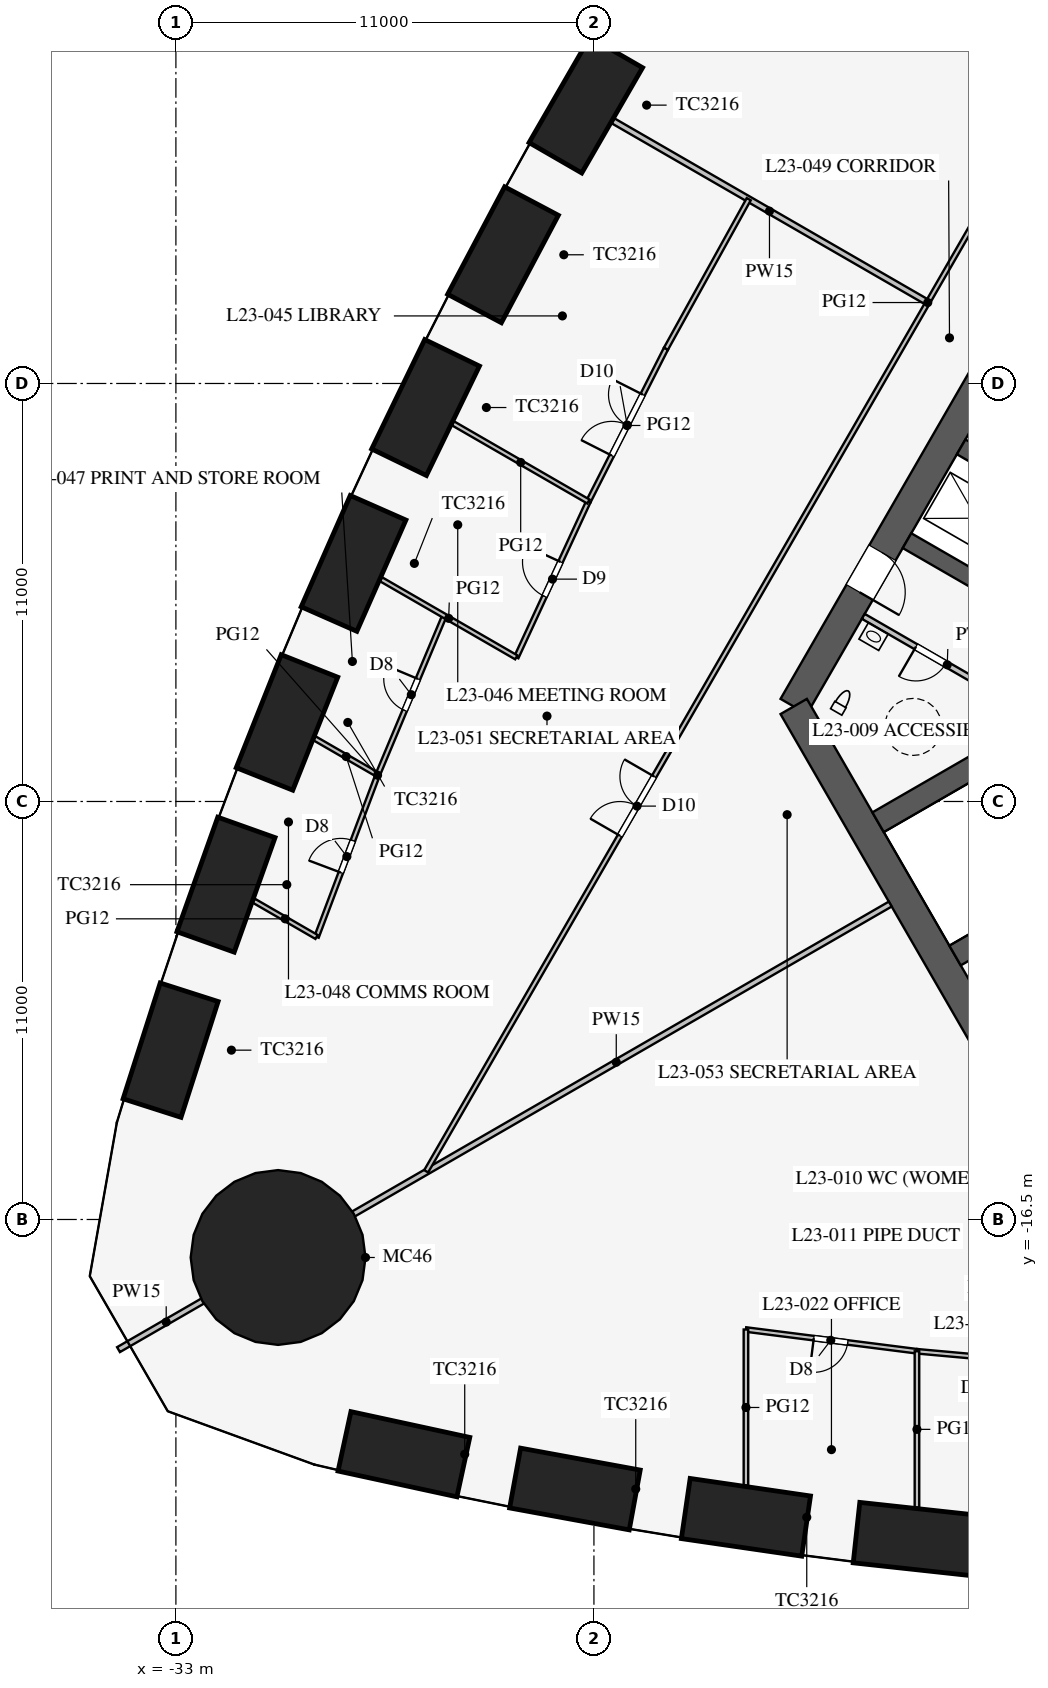
"""IFC4 building model, lengths in metres.
Left out: names, types, materials, properties, quantities, classifications, styles, units other than length and angle.
Written with IfcOpenShell. Run it as: python <this file> out.ifc"""

import sys

from ifc_helpers import new_model, si_unit, direction, frame, frame_2d, origin, origin_2d, place, context, subcontext, project, spatial, rectangle, circle, extrude, element, fill, save


model = new_model("IFC4")
c1 = context("Model", 3, precision=1e-05, world=origin(), true_north=direction((0.0, 1.0)))
c2 = subcontext(c1, "Body", "Model", "MODEL_VIEW")
j1 = project(units=[si_unit("LENGTHUNIT", "METRE"), si_unit("PLANEANGLEUNIT", "RADIAN")], contexts=[c1])
p1 = place(None, origin())
s1 = spatial("IfcSite", under=j1, at=p1, CompositionType="ELEMENT")
p2 = place(p1, origin())
s2 = spatial("IfcBuilding", under=s1, at=p2, CompositionType="ELEMENT")
p3 = place(p2, frame((0.0, 0.0, 103.1)))
s3 = spatial("IfcBuildingStorey", under=s2, at=p3, CompositionType="ELEMENT", Elevation=103.1)
for number, where, z_axis, x_axis in (
    (1, (-27.0, -22.677, 0.0), (0.0, 0.0, 1.0), (0.977, -0.212, 0.0)),
    (2, (-22.5, -23.593, 0.0), (0.0, 0.0, 1.0), (0.984, -0.18, 0.0)),
    (3, (-18.0, -24.337, 0.0), (0.0, 0.0, 1.0), (0.99, -0.144, 0.0)),
    (4, (-13.5, -24.913, 0.0), (0.0, 0.0, 1.0), (0.994, -0.108, 0.0)),
    (5, (-22.213, 12.825, 0.0), (0.0, 0.0, 1.0), (-0.5, -0.866, 0.0)),
    (6, (-24.393, 8.887, 0.0), (0.0, 0.0, 1.0), (-0.468, -0.883, 0.0)),
    (7, (-26.43, 4.867, 0.0), (0.0, 0.0, 1.0), (-0.436, -0.9, 0.0)),
    (8, (-28.325, 0.765, 0.0), (0.0, 0.0, 1.0), (-0.403, -0.915, 0.0)),
    (9, (-30.077, -3.42, 0.0), (0.0, 0.0, 1.0), (-0.37, -0.929, 0.0)),
    (10, (-31.682, -7.689, 0.0), (0.0, 0.0, 1.0), (-0.336, -0.942, 0.0)),
    (11, (-33.139, -12.044, 0.0), (0.0, 0.0, 1.0), (-0.305, -0.952, 0.0)),
):
    element("IfcColumn", number, at=place(p3, frame(where, z_axis=z_axis, x_axis=x_axis)), inside=s3, PredefinedType="COLUMN", context=c2, shape_type="SweptSolid", body=[
        extrude(rectangle(XDim=3.2, YDim=1.6, at=origin_2d()), origin(), (0.0, 0.0, 1.0), 4.2),
    ])
p4 = place(p3, frame((-30.311, -17.5, 0.0), z_axis=(0.0, 0.0, 1.0), x_axis=(1.0, 0.0, 0.0)))
e12 = element("IfcColumn", 12, at=p4, inside=s3, PredefinedType="COLUMN", context=c2, shape_type="SweptSolid", body=[
    extrude(circle(Radius=2.3, at=origin_2d()), origin(), (0.0, 0.0, 1.0), 4.2),
])
p5 = place(p3, frame((-5.773, 16.0, 0.0), z_axis=(0.0, 0.0, 1.0), x_axis=(-0.500002442456, -0.866023993627, 0.0)))
e13 = element("IfcWall", 13, at=p5, inside=s3, PredefinedType="SHEAR", context=c2, shape_type="SweptSolid", body=[
    extrude(rectangle(XDim=21.939, YDim=0.8, at=frame_2d((10.97, 0.0))), origin(), (0.0, 0.0, 1.0), 4.2),
])
p6 = place(p5, frame((17.27, 0.0, 0.0)))
e14 = element("IfcOpeningElement", 14, at=p6, cuts=e13, PredefinedType="OPENING", context=c2, shape_type="SweptSolid", body=[
    extrude(rectangle(XDim=1.2, YDim=2.1, at=frame_2d((0.6, 1.05))), frame((0.0, 0.41, 0.0), z_axis=(0.0, -1.0, 0.0), x_axis=(1.0, 0.0, 0.0)), (0.0, 0.0, 1.0), 0.82),
])
p7 = place(p5, frame((3.47, 0.0, 0.0)))
e15 = element("IfcOpeningElement", 15, at=p7, cuts=e13, PredefinedType="OPENING", context=c2, shape_type="SweptSolid", body=[
    extrude(rectangle(XDim=1.2, YDim=2.1, at=frame_2d((0.6, 1.05))), frame((0.0, 0.41, 0.0), z_axis=(0.0, -1.0, 0.0), x_axis=(1.0, 0.0, 0.0)), (0.0, 0.0, 1.0), 0.82),
])
p8 = place(p3, frame((-16.743, -3.0, 0.0), z_axis=(0.0, 0.0, 1.0), x_axis=(0.499995765644, -0.866027848477, 0.0)))
e16 = element("IfcWall", 16, at=p8, inside=s3, PredefinedType="SHEAR", context=c2, shape_type="SweptSolid", body=[
    extrude(rectangle(XDim=11.547, YDim=0.8, at=frame_2d((5.773, 0.0))), origin(), (0.0, 0.0, 1.0), 4.2),
])
for number, where, z_axis, x_axis in (
    (17, (-10.107, 2.544, 0.0), (0.0, 0.0, 1.0), (-0.866, 0.5, 0.0)),
    (18, (-11.532, 0.076, 0.0), (0.0, 0.0, 1.0), (-0.866, 0.5, 0.0)),
):
    element("IfcWall", number, at=place(p3, frame(where, z_axis=z_axis, x_axis=x_axis)), inside=s3, PredefinedType="SHEAR", context=c2, shape_type="SweptSolid", body=[
        extrude(rectangle(XDim=2.575, YDim=0.45, at=frame_2d((1.288, 0.0))), origin(), (0.0, 0.0, 1.0), 4.2),
    ])
for number, where, z_axis, x_axis in (
    (19, (-6.663, -1.509, 0.0), (0.0, 0.0, 1.0), (-0.866, -0.5, 0.0)),
    (20, (-4.638, -5.016, 0.0), (0.0, 0.0, 1.0), (-0.866, -0.5, 0.0)),
):
    element("IfcWall", number, at=place(p3, frame(where, z_axis=z_axis, x_axis=x_axis)), inside=s3, PredefinedType="SHEAR", context=c2, shape_type="SweptSolid", body=[
        extrude(rectangle(XDim=9.075, YDim=0.6, at=frame_2d((4.538, 0.0))), origin(), (0.0, 0.0, 1.0), 4.2),
    ])
p9 = place(p3, frame((-10.495, -3.178, 0.0), z_axis=(0.0, 0.0, 1.0), x_axis=(-0.86602216432, 0.500005610874, 0.0)))
e21 = element("IfcWall", 21, at=p9, inside=s3, PredefinedType="PARTITIONING", context=c2, shape_type="SweptSolid", body=[
    extrude(rectangle(XDim=5.1, YDim=0.15, at=frame_2d((2.55, 0.0))), origin(), (0.0, 0.0, 1.0), 4.0),
])
p10 = place(p9, frame((2.6, 0.0, 0.0)))
e22 = element("IfcOpeningElement", 22, at=p10, cuts=e21, PredefinedType="OPENING", context=c2, shape_type="SweptSolid", body=[
    extrude(rectangle(XDim=0.9, YDim=2.1, at=frame_2d((0.45, 1.05))), frame((0.0, 0.085, 0.0), z_axis=(0.0, -1.0, 0.0), x_axis=(1.0, 0.0, 0.0)), (0.0, 0.0, 1.0), 0.17),
])
p11 = place(p3, frame((-14.203, -8.2, 0.0), z_axis=(0.0, 0.0, 1.0), x_axis=(-0.866024668836, -0.500001272966, 0.0)))
e23 = element("IfcWall", 23, at=p11, inside=s3, PredefinedType="PARTITIONING", context=c2, shape_type="SweptSolid", body=[
    extrude(rectangle(XDim=16.65, YDim=0.15, at=frame_2d((8.325, 0.0))), origin(), (0.0, 0.0, 1.0), 2.3),
])
p12 = place(p3, frame((-32.0, -18.475, 0.0), z_axis=(0.0, 0.0, 1.0), x_axis=(-0.866042548026, -0.499970304126, 0.0)))
e24 = element("IfcWall", 24, at=p12, inside=s3, PredefinedType="PARTITIONING", context=c2, shape_type="SweptSolid", body=[
    extrude(rectangle(XDim=2.899, YDim=0.15, at=frame_2d((1.45, 0.0))), origin(), (0.0, 0.0, 1.0), 2.3),
])
p13 = place(p3, frame((-13.5, -19.968, 0.0), z_axis=(0.0, 0.0, 1.0), x_axis=(0.995930325215, -0.090126507295, 0.0)))
e25 = element("IfcWall", 25, at=p13, inside=s3, PredefinedType="PARTITIONING", context=c2, shape_type="SweptSolid", body=[
    extrude(rectangle(XDim=4.518, YDim=0.12, at=frame_2d((2.259, 0.0))), origin(), (0.0, 0.0, 1.0), 2.9),
])
p14 = place(p13, frame((1.8, 0.0, 0.15)))
e26 = element("IfcOpeningElement", 26, at=p14, cuts=e25, PredefinedType="OPENING", context=c2, shape_type="SweptSolid", body=[
    extrude(rectangle(XDim=0.9, YDim=2.1, at=frame_2d((0.45, 1.05))), frame((0.0, 0.07, 0.0), z_axis=(0.0, -1.0, 0.0), x_axis=(1.0, 0.0, 0.0)), (0.0, 0.0, 1.0), 0.14),
])
p15 = place(p3, frame((-18.0, -19.396, 0.0), z_axis=(0.0, 0.0, 1.0), x_axis=(0.992010652594, -0.12615413247, 0.0)))
e27 = element("IfcWall", 27, at=p15, inside=s3, PredefinedType="PARTITIONING", context=c2, shape_type="SweptSolid", body=[
    extrude(rectangle(XDim=4.536, YDim=0.12, at=frame_2d((2.268, 0.0))), origin(), (0.0, 0.0, 1.0), 2.9),
])
p16 = place(p15, frame((1.8, 0.0, 0.15)))
e28 = element("IfcOpeningElement", 28, at=p16, cuts=e27, PredefinedType="OPENING", context=c2, shape_type="SweptSolid", body=[
    extrude(rectangle(XDim=0.9, YDim=2.1, at=frame_2d((0.45, 1.05))), frame((0.0, 0.07, 0.0), z_axis=(0.0, -1.0, 0.0), x_axis=(1.0, 0.0, 0.0)), (0.0, 0.0, 1.0), 0.14),
])
p17 = place(p3, frame((-13.5, -19.968, 0.0), z_axis=(0.0, 0.0, 1.0), x_axis=(0.0, -1.0, 0.0)))
e29 = element("IfcWall", 29, at=p17, inside=s3, PredefinedType="PARTITIONING", context=c2, shape_type="SweptSolid", body=[
    extrude(rectangle(XDim=4.11, YDim=0.12, at=frame_2d((2.055, 0.0))), origin(), (0.0, 0.0, 1.0), 2.2),
])
p18 = place(p3, frame((-18.0, -19.396, 0.0), z_axis=(0.0, 0.0, 1.0), x_axis=(0.0, -1.0, 0.0)))
e30 = element("IfcWall", 30, at=p18, inside=s3, PredefinedType="PARTITIONING", context=c2, shape_type="SweptSolid", body=[
    extrude(rectangle(XDim=4.103, YDim=0.12, at=frame_2d((2.052, 0.0))), origin(), (0.0, 0.0, 1.0), 2.4),
])
p19 = place(p3, frame((-13.268, 7.66, 0.0), z_axis=(0.0, 0.0, 1.0), x_axis=(-0.866013963754, 0.500019814191, 0.0)))
e31 = element("IfcWall", 31, at=p19, inside=s3, PredefinedType="PARTITIONING", context=c2, shape_type="SweptSolid", body=[
    extrude(rectangle(XDim=9.5, YDim=0.15, at=frame_2d((4.75, 0.0))), origin(), (0.0, 0.0, 1.0), 2.4),
])
p20 = place(p3, frame((-0.016, 30.491, 0.0), z_axis=(0.0, 0.0, 1.0), x_axis=(-0.50000091641, -0.866024874695, 0.0)))
e32 = element("IfcWall", 32, at=p20, inside=s3, PredefinedType="PARTITIONING", context=c2, shape_type="SweptSolid", body=[
    extrude(rectangle(XDim=52.796, YDim=0.12, at=frame_2d((26.398, 0.0))), origin(), (0.0, 0.0, 1.0), 2.9),
])
p21 = place(p20, frame((10.2, 0.0, 0.15)))
e33 = element("IfcOpeningElement", 33, at=p21, cuts=e32, PredefinedType="OPENING", context=c2, shape_type="SweptSolid", body=[
    extrude(rectangle(XDim=1.8, YDim=2.1, at=frame_2d((0.9, 1.05))), frame((0.0, 0.07, 0.0), z_axis=(0.0, -1.0, 0.0), x_axis=(1.0, 0.0, 0.0)), (0.0, 0.0, 1.0), 0.14),
])
p22 = place(p20, frame((40.8, 0.0, 0.15)))
e34 = element("IfcOpeningElement", 34, at=p22, cuts=e32, PredefinedType="OPENING", context=c2, shape_type="SweptSolid", body=[
    extrude(rectangle(XDim=1.8, YDim=2.1, at=frame_2d((0.9, 1.05))), frame((0.0, 0.07, 0.0), z_axis=(0.0, -1.0, 0.0), x_axis=(1.0, 0.0, 0.0)), (0.0, 0.0, 1.0), 0.14),
])
p23 = place(p3, frame((-17.927, 10.35, 0.0), z_axis=(0.0, 0.0, 1.0), x_axis=(-0.484292898211, -0.874905931368, 0.0)))
e35 = element("IfcWall", 35, at=p23, inside=s3, PredefinedType="PARTITIONING", context=c2, shape_type="SweptSolid", body=[
    extrude(rectangle(XDim=4.501, YDim=0.12, at=frame_2d((2.25, 0.0))), origin(), (0.0, 0.0, 1.0), 2.9),
])
p24 = place(p3, frame((-25.935, -0.615, 0.0), z_axis=(0.0, 0.0, 1.0), x_axis=(-0.386762112496, -0.922179520667, 0.0)))
e36 = element("IfcWall", 36, at=p24, inside=s3, PredefinedType="PARTITIONING", context=c2, shape_type="SweptSolid", body=[
    extrude(rectangle(XDim=4.536, YDim=0.12, at=frame_2d((2.268, 0.0))), origin(), (0.0, 0.0, 1.0), 2.9),
])
p25 = place(p24, frame((1.8, 0.0, 0.15)))
e37 = element("IfcOpeningElement", 37, at=p25, cuts=e36, PredefinedType="OPENING", context=c2, shape_type="SweptSolid", body=[
    extrude(rectangle(XDim=0.9, YDim=2.1, at=frame_2d((0.45, 1.05))), frame((0.0, 0.07, 0.0), z_axis=(0.0, -1.0, 0.0), x_axis=(1.0, 0.0, 0.0)), (0.0, 0.0, 1.0), 0.14),
])
p26 = place(p3, frame((-27.689, -4.798, 0.0), z_axis=(0.0, 0.0, 1.0), x_axis=(-0.352941426142, -0.935645418795, 0.0)))
e38 = element("IfcWall", 38, at=p26, inside=s3, PredefinedType="PARTITIONING", context=c2, shape_type="SweptSolid", body=[
    extrude(rectangle(XDim=4.561, YDim=0.12, at=frame_2d((2.28, 0.0))), origin(), (0.0, 0.0, 1.0), 2.9),
])
p27 = place(p26, frame((1.85, 0.0, 0.15)))
e39 = element("IfcOpeningElement", 39, at=p27, cuts=e38, PredefinedType="OPENING", context=c2, shape_type="SweptSolid", body=[
    extrude(rectangle(XDim=0.9, YDim=2.1, at=frame_2d((0.45, 1.05))), frame((0.0, 0.07, 0.0), z_axis=(0.0, -1.0, 0.0), x_axis=(1.0, 0.0, 0.0)), (0.0, 0.0, 1.0), 0.14),
])
p28 = place(p3, frame((-20.106, 6.412, 0.0), z_axis=(0.0, 0.0, 1.0), x_axis=(-0.452471679136, -0.891778772779, 0.0)))
e40 = element("IfcWall", 40, at=p28, inside=s3, PredefinedType="PARTITIONING", context=c2, shape_type="SweptSolid", body=[
    extrude(rectangle(XDim=4.507, YDim=0.12, at=frame_2d((2.253, 0.0))), origin(), (0.0, 0.0, 1.0), 2.9),
])
p29 = place(p28, frame((1.35, 0.0, 0.15)))
e41 = element("IfcOpeningElement", 41, at=p29, cuts=e40, PredefinedType="OPENING", context=c2, shape_type="SweptSolid", body=[
    extrude(rectangle(XDim=1.8, YDim=2.1, at=frame_2d((0.9, 1.05))), frame((0.0, 0.07, 0.0), z_axis=(0.0, -1.0, 0.0), x_axis=(1.0, 0.0, 0.0)), (0.0, 0.0, 1.0), 0.14),
])
p30 = place(p3, frame((-22.145, 2.393, 0.0), z_axis=(0.0, 0.0, 1.0), x_axis=(-0.41992827805, -0.90755729367, 0.0)))
e42 = element("IfcWall", 42, at=p30, inside=s3, PredefinedType="PARTITIONING", context=c2, shape_type="SweptSolid", body=[
    extrude(rectangle(XDim=4.519, YDim=0.12, at=frame_2d((2.259, 0.0))), origin(), (0.0, 0.0, 1.0), 2.9),
])
p31 = place(p30, frame((1.75, 0.0, 0.15)))
e43 = element("IfcOpeningElement", 43, at=p31, cuts=e42, PredefinedType="OPENING", context=c2, shape_type="SweptSolid", body=[
    extrude(rectangle(XDim=1.0, YDim=2.1, at=frame_2d((0.5, 1.05))), frame((0.0, 0.07, 0.0), z_axis=(0.0, -1.0, 0.0), x_axis=(1.0, 0.0, 0.0)), (0.0, 0.0, 1.0), 0.14),
])
p32 = place(p3, frame((-24.043, -1.708, 0.0), z_axis=(0.0, 0.0, 1.0), x_axis=(-0.866019409031, 0.500010383074, 0.0)))
e44 = element("IfcWall", 44, at=p32, inside=s3, PredefinedType="PARTITIONING", context=c2, shape_type="SweptSolid", body=[
    extrude(rectangle(XDim=4.11, YDim=0.12, at=frame_2d((2.055, 0.0))), origin(), (0.0, 0.0, 1.0), 2.2),
])
p33 = place(p3, frame((-27.689, -4.798, 0.0), z_axis=(0.0, 0.0, 1.0), x_axis=(-0.866041454758, 0.499972197867, 0.0)))
e45 = element("IfcWall", 45, at=p33, inside=s3, PredefinedType="PARTITIONING", context=c2, shape_type="SweptSolid", body=[
    extrude(rectangle(XDim=1.918, YDim=0.12, at=frame_2d((0.959, 0.0))), origin(), (0.0, 0.0, 1.0), 2.4),
])
p34 = place(p3, frame((-29.299, -9.065, 0.0), z_axis=(0.0, 0.0, 1.0), x_axis=(-0.865998066356, 0.500047346826, 0.0)))
e46 = element("IfcWall", 46, at=p34, inside=s3, PredefinedType="PARTITIONING", context=c2, shape_type="SweptSolid", body=[
    extrude(rectangle(XDim=1.908, YDim=0.12, at=frame_2d((0.954, 0.0))), origin(), (0.0, 0.0, 1.0), 2.6),
])
p35 = place(p3, frame((-22.145, 2.393, 0.0), z_axis=(0.0, 0.0, 1.0), x_axis=(-0.866018637367, 0.500011719595, 0.0)))
e47 = element("IfcWall", 47, at=p35, inside=s3, PredefinedType="PARTITIONING", context=c2, shape_type="SweptSolid", body=[
    extrude(rectangle(XDim=4.116, YDim=0.12, at=frame_2d((2.058, 0.0))), origin(), (0.0, 0.0, 1.0), 2.6),
])
p36 = place(p10, origin())
e48 = element("IfcDoor", 48, at=p36, inside=s3, OperationType="SINGLE_SWING_RIGHT", PredefinedType="DOOR", context=c2, shape_type="SweptSolid", body=[
    extrude(rectangle(XDim=0.9, YDim=2.1, at=frame_2d((0.45, 1.05))), frame((0.0, 0.025, 0.0), z_axis=(0.0, -1.0, 0.0), x_axis=(1.0, 0.0, 0.0)), (0.0, 0.0, 1.0), 0.05),
])
fill(e22, e48)
p37 = place(p6, origin())
e49 = element("IfcDoor", 49, at=p37, inside=s3, OperationType="SINGLE_SWING_RIGHT", PredefinedType="DOOR", context=c2, shape_type="SweptSolid", body=[
    extrude(rectangle(XDim=1.2, YDim=2.1, at=frame_2d((0.6, 1.05))), frame((0.0, 0.025, 0.0), z_axis=(0.0, -1.0, 0.0), x_axis=(1.0, 0.0, 0.0)), (0.0, 0.0, 1.0), 0.05),
])
fill(e14, e49)
p38 = place(p16, frame((0.9, 0.0, 0.0), z_axis=(0.0, 0.0, 1.0), x_axis=(-1.0, 0.0, 0.0)))
e50 = element("IfcDoor", 50, at=p38, inside=s3, OperationType="SINGLE_SWING_RIGHT", PredefinedType="DOOR", context=c2, shape_type="SweptSolid", body=[
    extrude(rectangle(XDim=0.9, YDim=2.1, at=frame_2d((0.45, 1.05))), frame((0.0, 0.025, 0.0), z_axis=(0.0, -1.0, 0.0), x_axis=(1.0, 0.0, 0.0)), (0.0, 0.0, 1.0), 0.05),
])
fill(e28, e50)
p39 = place(p29, frame((1.8, 0.0, 0.0), z_axis=(0.0, 0.0, 1.0), x_axis=(-1.0, 0.0, 0.0)))
e51 = element("IfcDoor", 51, at=p39, inside=s3, OperationType="DOUBLE_DOOR_SINGLE_SWING", PredefinedType="DOOR", context=c2, shape_type="SweptSolid", body=[
    extrude(rectangle(XDim=1.8, YDim=2.1, at=frame_2d((0.9, 1.05))), frame((0.0, 0.025, 0.0), z_axis=(0.0, -1.0, 0.0), x_axis=(1.0, 0.0, 0.0)), (0.0, 0.0, 1.0), 0.05),
])
fill(e41, e51)
p40 = place(p31, frame((1.0, 0.0, 0.0), z_axis=(0.0, 0.0, 1.0), x_axis=(-1.0, 0.0, 0.0)))
e52 = element("IfcDoor", 52, at=p40, inside=s3, OperationType="SINGLE_SWING_RIGHT", PredefinedType="DOOR", context=c2, shape_type="SweptSolid", body=[
    extrude(rectangle(XDim=1.0, YDim=2.1, at=frame_2d((0.5, 1.05))), frame((0.0, 0.025, 0.0), z_axis=(0.0, -1.0, 0.0), x_axis=(1.0, 0.0, 0.0)), (0.0, 0.0, 1.0), 0.05),
])
fill(e43, e52)
p41 = place(p25, frame((0.9, 0.0, 0.0), z_axis=(0.0, 0.0, 1.0), x_axis=(-1.0, 0.0, 0.0)))
e53 = element("IfcDoor", 53, at=p41, inside=s3, OperationType="SINGLE_SWING_RIGHT", PredefinedType="DOOR", context=c2, shape_type="SweptSolid", body=[
    extrude(rectangle(XDim=0.9, YDim=2.1, at=frame_2d((0.45, 1.05))), frame((0.0, 0.025, 0.0), z_axis=(0.0, -1.0, 0.0), x_axis=(1.0, 0.0, 0.0)), (0.0, 0.0, 1.0), 0.05),
])
fill(e37, e53)
p42 = place(p27, frame((0.9, 0.0, 0.0), z_axis=(0.0, 0.0, 1.0), x_axis=(-1.0, 0.0, 0.0)))
e54 = element("IfcDoor", 54, at=p42, inside=s3, OperationType="SINGLE_SWING_LEFT", PredefinedType="DOOR", context=c2, shape_type="SweptSolid", body=[
    extrude(rectangle(XDim=0.9, YDim=2.1, at=frame_2d((0.45, 1.05))), frame((0.0, 0.025, 0.0), z_axis=(0.0, -1.0, 0.0), x_axis=(1.0, 0.0, 0.0)), (0.0, 0.0, 1.0), 0.05),
])
fill(e39, e54)
p43 = place(p22, frame((1.8, 0.0, 0.0), z_axis=(0.0, 0.0, 1.0), x_axis=(-1.0, 0.0, 0.0)))
e55 = element("IfcDoor", 55, at=p43, inside=s3, OperationType="DOUBLE_DOOR_SINGLE_SWING", PredefinedType="DOOR", context=c2, shape_type="SweptSolid", body=[
    extrude(rectangle(XDim=1.8, YDim=2.1, at=frame_2d((0.9, 1.05))), frame((0.0, 0.025, 0.0), z_axis=(0.0, -1.0, 0.0), x_axis=(1.0, 0.0, 0.0)), (0.0, 0.0, 1.0), 0.05),
])
fill(e34, e55)
save(model, sys.argv[1])
